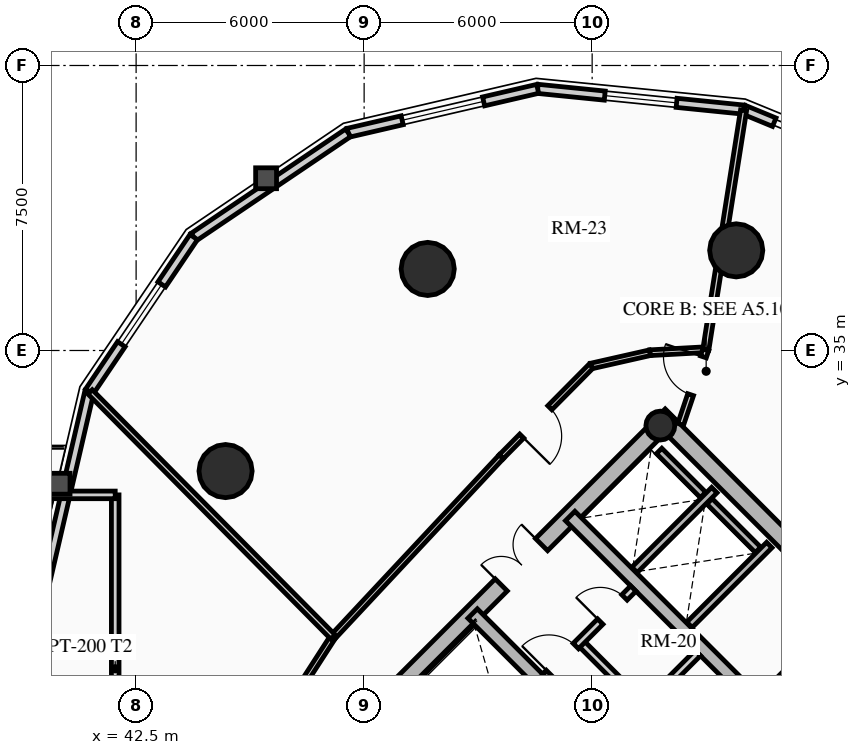
"""IFC4 building model, lengths in metres.
Left out: names, types, materials, properties, quantities, classifications, styles, units other than length and angle.
Written with IfcOpenShell. Run it as: python <this file> out.ifc"""

import sys

from ifc_helpers import new_model, si_unit, direction, frame, frame_2d, origin, origin_2d, place, context, subcontext, project, spatial, rectangle, circle, hollow_circle, extrude, source, transform, mapped, element, fill, save


model = new_model("IFC4")
c1 = context("Model", 3, precision=1e-05, world=origin(), true_north=direction((0.0, 1.0)))
c2 = subcontext(c1, "Body", "Model", "MODEL_VIEW")
j1 = project(units=[si_unit("LENGTHUNIT", "METRE"), si_unit("PLANEANGLEUNIT", "RADIAN")], contexts=[c1])
p1 = place(None, origin())
s1 = spatial("IfcSite", under=j1, at=p1, CompositionType="ELEMENT")
p2 = place(p1, origin())
s2 = spatial("IfcBuilding", under=s1, at=p2, CompositionType="ELEMENT")
p3 = place(p2, frame((0.0, 0.0, 132.88)))
s3 = spatial("IfcBuildingStorey", under=s2, at=p3, CompositionType="ELEMENT", Elevation=132.88)
p4 = place(p3, frame((66.303, 23.263, 0.0), z_axis=(0.0, 0.0, 1.0), x_axis=(-0.707106781187, 0.707106781187, 0.0)))
e1 = element("IfcWall", 1, at=p4, inside=s3, PredefinedType="SHEAR", context=c2, shape_type="SweptSolid", body=[
    extrude(rectangle(XDim=14.2, YDim=0.45, at=frame_2d((7.1, 0.0))), origin(), (0.0, 0.0, 1.0), 3.72),
])
p5 = place(p3, frame((48.856, 25.578, 0.0), z_axis=(0.0, 0.0, 1.0), x_axis=(0.707106781187, 0.707106781187, 0.0)))
e2 = element("IfcWall", 2, at=p5, inside=s3, PredefinedType="SHEAR", context=c2, shape_type="SweptSolid", body=[
    extrude(rectangle(XDim=10.7, YDim=0.45, at=frame_2d((5.35, 0.0))), origin(), (0.0, 0.0, 1.0), 3.72),
])
m1 = source(origin(), c2, "Body", "SweptSolid", [
    extrude(rectangle(XDim=1.5, YDim=2.02, at=frame_2d((0.75, 1.01))), frame((0.0, 0.235, 0.0), z_axis=(0.0, -1.0, 0.0), x_axis=(1.0, 0.0, 0.0)), (0.0, 0.0, 1.0), 0.47),
])
p6 = place(p5, frame((4.6, 0.0, 0.0)))
e3 = element("IfcOpeningElement", 3, at=p6, cuts=e2, PredefinedType="OPENING", context=c2, shape_type="MappedRepresentation", body=[
    mapped(m1, transform((0.0, 0.0, 0.0), x_axis=(1.0, 0.0, 0.0), y_axis=(0.0, 1.0, 0.0), z_axis=(0.0, 0.0, 1.0), scale=1.0)),
])
p7 = place(p3, frame((61.078, 18.355, 0.0), z_axis=(0.0, 0.0, 1.0), x_axis=(-0.707106781187, 0.707106781187, 0.0)))
e4 = element("IfcWall", 4, at=p7, inside=s3, PredefinedType="SHEAR", context=c2, shape_type="SweptSolid", body=[
    extrude(rectangle(XDim=13.75, YDim=0.35, at=frame_2d((6.875, 0.0))), origin(), (0.0, 0.0, 1.0), 3.72),
])
m2 = source(origin(), c2, "Body", "SweptSolid", [
    extrude(rectangle(XDim=1.1, YDim=2.015, at=frame_2d((0.55, 1.007))), frame((0.0, 0.185, 0.0), z_axis=(0.0, -1.0, 0.0), x_axis=(1.0, 0.0, 0.0)), (0.0, 0.0, 1.0), 0.37),
])
p8 = place(p7, frame((4.875, 0.0, 0.0)))
e5 = element("IfcOpeningElement", 5, at=p8, cuts=e4, PredefinedType="OPENING", context=c2, shape_type="MappedRepresentation", body=[
    mapped(m2, transform((0.0, 0.0, 0.0), x_axis=(1.0, 0.0, 0.0), y_axis=(0.0, 1.0, 0.0), z_axis=(0.0, 0.0, 1.0), scale=1.0)),
])
p9 = place(p7, frame((0.65, 0.0, 0.0)))
e6 = element("IfcOpeningElement", 6, at=p9, cuts=e4, PredefinedType="OPENING", context=c2, shape_type="MappedRepresentation", body=[
    mapped(m2, transform((0.0, 0.0, 0.0), x_axis=(1.0, 0.0, 0.0), y_axis=(0.0, 1.0, 0.0), z_axis=(0.0, 0.0, 1.0), scale=1.0)),
])
p10 = place(p7, frame((2.65, 0.0, 0.0)))
e7 = element("IfcOpeningElement", 7, at=p10, cuts=e4, PredefinedType="OPENING", context=c2, shape_type="MappedRepresentation", body=[
    mapped(m2, transform((0.0, 0.0, 0.0), x_axis=(1.0, 0.0, 0.0), y_axis=(0.0, 1.0, 0.0), z_axis=(0.0, 0.0, 1.0), scale=1.0)),
])
m3 = source(origin(), c2, "Body", "SweptSolid", [
    extrude(rectangle(XDim=1.15, YDim=2.02, at=frame_2d((0.575, 1.01))), frame((0.0, 0.185, 0.0), z_axis=(0.0, -1.0, 0.0), x_axis=(1.0, 0.0, 0.0)), (0.0, 0.0, 1.0), 0.37),
])
p11 = place(p7, frame((7.295, 0.0, 0.0)))
e8 = element("IfcOpeningElement", 8, at=p11, cuts=e4, PredefinedType="OPENING", context=c2, shape_type="MappedRepresentation", body=[
    mapped(m3, transform((0.0, 0.0, 0.0), x_axis=(1.0, 0.0, 0.0), y_axis=(0.0, 1.0, 0.0), z_axis=(0.0, 0.0, 1.0), scale=1.0)),
])
p12 = place(p3, frame((63.645, 20.922, 0.0), z_axis=(0.0, 0.0, 1.0), x_axis=(-0.707106781187, 0.707106781187, 0.0)))
e9 = element("IfcWall", 9, at=p12, inside=s3, PredefinedType="SHEAR", context=c2, shape_type="SweptSolid", body=[
    extrude(rectangle(XDim=13.75, YDim=0.35, at=frame_2d((6.875, 0.0))), origin(), (0.0, 0.0, 1.0), 3.72),
])
p13 = place(p12, frame((5.305, 0.0, 0.0)))
e10 = element("IfcOpeningElement", 10, at=p13, cuts=e9, PredefinedType="OPENING", context=c2, shape_type="MappedRepresentation", body=[
    mapped(m3, transform((0.0, 0.0, 0.0), x_axis=(1.0, 0.0, 0.0), y_axis=(0.0, 1.0, 0.0), z_axis=(0.0, 0.0, 1.0), scale=1.0)),
])
p14 = place(p3, frame((58.893, 25.674, 0.0), z_axis=(0.0, 0.0, 1.0), x_axis=(0.707106781187, 0.707106781187, 0.0)))
e11 = element("IfcWall", 11, at=p14, inside=s3, PredefinedType="SHEAR", context=c2, shape_type="SweptSolid", body=[
    extrude(rectangle(XDim=3.285, YDim=0.35, at=frame_2d((1.643, 0.0))), origin(), (0.0, 0.0, 1.0), 3.72),
])
p15 = place(p3, frame((56.294, 33.024, 0.0), z_axis=(0.0, 0.0, 1.0), x_axis=(0.707106781187, 0.707106781187, 0.0)))
e12 = element("IfcColumn", 12, at=p15, inside=s3, PredefinedType="COLUMN", context=c2, shape_type="SweptSolid", body=[
    extrude(hollow_circle(Radius=0.38, WallThickness=0.032, at=origin_2d()), origin(), (0.0, 0.0, 1.0), 3.72),
])
for number, where, z_axis, x_axis in (
    (13, (58.291, 37.635, 0.0), (0.0, 0.0, 1.0), (1.0, 0.0, 0.0)),
    (14, (50.173, 37.146, 0.0), (0.0, 0.0, 1.0), (1.0, 0.0, 0.0)),
    (15, (44.854, 31.827, 0.0), (0.0, 0.0, 1.0), (1.0, 0.0, 0.0)),
):
    element("IfcColumn", number, at=place(p3, frame(where, z_axis=z_axis, x_axis=x_axis)), inside=s3, PredefinedType="USERDEFINED", context=c2, shape_type="SweptSolid", body=[
        extrude(circle(Radius=0.7, at=origin_2d()), origin(), (0.0, 0.0, 1.0), 3.72),
    ])
p16 = place(p3, frame((58.487, 41.339, 0.0), z_axis=(0.0, 0.0, 1.0), x_axis=(0.924556017656, -0.381046152345, 0.0)))
e16 = element("IfcWall", 16, at=p16, inside=s3, PredefinedType="SOLIDWALL", context=c2, shape_type="SweptSolid", body=[
    extrude(rectangle(XDim=0.87, YDim=0.24, at=frame_2d((0.435, 0.0))), origin(), (0.0, 0.0, 1.0), 2.949),
])
p17 = place(p3, frame((53.067, 41.885, 0.0), z_axis=(0.0, 0.0, 1.0), x_axis=(0.994971754311, -0.10015591906, 0.0)))
e17 = element("IfcWall", 17, at=p17, inside=s3, PredefinedType="SOLIDWALL", context=c2, shape_type="SweptSolid", body=[
    extrude(rectangle(XDim=5.448, YDim=0.24, at=frame_2d((2.724, 0.0))), origin(), (0.0, 0.0, 1.0), 2.949),
])
m4 = source(origin(), c2, "Body", "SweptSolid", [
    extrude(rectangle(XDim=1.9, YDim=1.35, at=frame_2d((0.95, 0.675))), frame((0.0, 0.13, 0.0), z_axis=(0.0, -1.0, 0.0), x_axis=(1.0, 0.0, 0.0)), (0.0, 0.0, 1.0), 0.26),
])
p18 = place(p17, frame((1.774, 0.0, 0.65)))
e18 = element("IfcOpeningElement", 18, at=p18, cuts=e17, PredefinedType="OPENING", context=c2, shape_type="MappedRepresentation", body=[
    mapped(m4, transform((0.0, 0.0, 0.0), x_axis=(1.0, 0.0, 0.0), y_axis=(0.0, 1.0, 0.0), z_axis=(0.0, 0.0, 1.0), scale=1.0)),
])
p19 = place(p3, frame((48.08, 40.729, 0.0), z_axis=(0.0, 0.0, 1.0), x_axis=(0.974165631126, 0.225834725257, 0.0)))
e19 = element("IfcWall", 19, at=p19, inside=s3, PredefinedType="SOLIDWALL", context=c2, shape_type="SweptSolid", body=[
    extrude(rectangle(XDim=5.119, YDim=0.24, at=frame_2d((2.56, 0.0))), origin(), (0.0, 0.0, 1.0), 2.949),
])
m5 = source(origin(), c2, "Body", "SweptSolid", [
    extrude(rectangle(XDim=2.2, YDim=1.35, at=frame_2d((1.1, 0.675))), frame((0.0, 0.13, 0.0), z_axis=(0.0, -1.0, 0.0), x_axis=(1.0, 0.0, 0.0)), (0.0, 0.0, 1.0), 0.26),
])
p20 = place(p19, frame((1.459, 0.0, 0.65)))
e20 = element("IfcOpeningElement", 20, at=p20, cuts=e19, PredefinedType="OPENING", context=c2, shape_type="MappedRepresentation", body=[
    mapped(m5, transform((0.0, 0.0, 0.0), x_axis=(1.0, 0.0, 0.0), y_axis=(0.0, 1.0, 0.0), z_axis=(0.0, 0.0, 1.0), scale=1.0)),
])
p21 = place(p3, frame((44.015, 37.985, 0.0), z_axis=(0.0, 0.0, 1.0), x_axis=(0.828781148131, 0.559572880421, 0.0)))
e21 = element("IfcWall", 21, at=p21, inside=s3, PredefinedType="SOLIDWALL", context=c2, shape_type="SweptSolid", body=[
    extrude(rectangle(XDim=4.905, YDim=0.24, at=frame_2d((2.452, 0.0))), origin(), (0.0, 0.0, 1.0), 2.949),
])
p22 = place(p3, frame((41.271, 33.92, 0.0), z_axis=(0.0, 0.0, 1.0), x_axis=(0.559572880421, 0.828781148131, 0.0)))
e22 = element("IfcWall", 22, at=p22, inside=s3, PredefinedType="SOLIDWALL", context=c2, shape_type="SweptSolid", body=[
    extrude(rectangle(XDim=4.905, YDim=0.24, at=frame_2d((2.452, 0.0))), origin(), (0.0, 0.0, 1.0), 2.949),
])
p23 = place(p22, frame((1.502, 0.0, 0.65)))
e23 = element("IfcOpeningElement", 23, at=p23, cuts=e22, PredefinedType="OPENING", context=c2, shape_type="MappedRepresentation", body=[
    mapped(m4, transform((0.0, 0.0, 0.0), x_axis=(1.0, 0.0, 0.0), y_axis=(0.0, 1.0, 0.0), z_axis=(0.0, 0.0, 1.0), scale=1.0)),
])
p24 = place(p3, frame((40.115, 28.933, 0.0), z_axis=(0.0, 0.0, 1.0), x_axis=(0.225834725257, 0.974165631126, 0.0)))
e24 = element("IfcWall", 24, at=p24, inside=s3, PredefinedType="SOLIDWALL", context=c2, shape_type="SweptSolid", body=[
    extrude(rectangle(XDim=5.119, YDim=0.24, at=frame_2d((2.56, 0.0))), origin(), (0.0, 0.0, 1.0), 2.949),
])
p25 = place(p3, frame((57.062, 27.781, 0.0), z_axis=(0.0, 0.0, 1.0), x_axis=(0.707106781187, 0.707106781187, 0.0)))
e25 = element("IfcWall", 25, at=p25, inside=s3, PredefinedType="SHEAR", context=c2, shape_type="SweptSolid", body=[
    extrude(rectangle(XDim=2.97, YDim=0.2, at=frame_2d((1.485, 0.0))), origin(), (0.0, 0.0, 1.0), 3.72),
])
p26 = place(p3, frame((55.615, 29.227, 0.0), z_axis=(0.0, 0.0, 1.0), x_axis=(0.707147878904, 0.70706568108, 0.0)))
e26 = element("IfcWall", 26, at=p26, inside=s3, PredefinedType="SHEAR", context=c2, shape_type="SweptSolid", body=[
    extrude(rectangle(XDim=2.97, YDim=0.2, at=frame_2d((1.485, 0.0))), origin(), (0.0, 0.0, 1.0), 3.72),
])
p27 = place(p3, frame((58.865, 29.754, 0.0), z_axis=(0.0, 0.0, 1.0), x_axis=(-0.707174411312, 0.707039144592, 0.0)))
e27 = element("IfcWall", 27, at=p27, inside=s3, PredefinedType="SHEAR", context=c2, shape_type="SweptSolid", body=[
    extrude(rectangle(XDim=1.805, YDim=0.2, at=frame_2d((0.902, 0.0))), origin(), (0.0, 0.0, 1.0), 3.72),
])
p28 = place(p3, frame((57.419, 31.2, 0.0), z_axis=(0.0, 0.0, 1.0), x_axis=(-0.707032117043, 0.707181437447, 0.0)))
e28 = element("IfcWall", 28, at=p28, inside=s3, PredefinedType="SHEAR", context=c2, shape_type="SweptSolid", body=[
    extrude(rectangle(XDim=1.635, YDim=0.2, at=frame_2d((0.817, 0.0))), origin(), (0.0, 0.0, 1.0), 3.72),
])
p29 = place(p3, frame((41.95, 17.8, 0.0), z_axis=(0.0, 0.0, 1.0), x_axis=(0.0, 1.0, 0.0)))
e29 = element("IfcWall", 29, at=p29, inside=s3, PredefinedType="PARTITIONING", context=c2, shape_type="SweptSolid", body=[
    extrude(rectangle(XDim=13.4, YDim=0.2, at=frame_2d((6.7, 0.0))), origin(), (0.0, 0.0, 1.0), 2.949),
])
m6 = source(origin(), c2, "Body", "SweptSolid", [
    extrude(rectangle(XDim=1.8, YDim=2.05, at=frame_2d((0.9, 1.025))), frame((0.0, 0.11, 0.0), z_axis=(0.0, -1.0, 0.0), x_axis=(1.0, 0.0, 0.0)), (0.0, 0.0, 1.0), 0.22),
])
p30 = place(p29, frame((2.1, 0.0, 0.0)))
e30 = element("IfcOpeningElement", 30, at=p30, cuts=e29, PredefinedType="OPENING", context=c2, shape_type="MappedRepresentation", body=[
    mapped(m6, transform((0.0, 0.0, 0.0), x_axis=(1.0, 0.0, 0.0), y_axis=(0.0, 1.0, 0.0), z_axis=(0.0, 0.0, 1.0), scale=1.0)),
])
p31 = place(p3, frame((39.85, 31.2, 0.0), z_axis=(0.0, 0.0, 1.0), x_axis=(1.0, 0.0, 0.0)))
e31 = element("IfcWall", 31, at=p31, inside=s3, PredefinedType="PARTITIONING", context=c2, shape_type="SweptSolid", body=[
    extrude(rectangle(XDim=2.1, YDim=0.2, at=frame_2d((1.05, 0.0))), origin(), (0.0, 0.0, 1.0), 2.949),
])
p32 = place(p3, frame((54.961, 24.719, 0.0), z_axis=(0.0, 0.0, 1.0), x_axis=(0.707106781187, 0.707106781187, 0.0)))
e32 = element("IfcWall", 32, at=p32, inside=s3, PredefinedType="PARTITIONING", context=c2, shape_type="SweptSolid", body=[
    extrude(rectangle(XDim=3.28, YDim=0.2, at=frame_2d((1.64, 0.0))), origin(), (0.0, 0.0, 1.0), 3.425),
])
m7 = source(origin(), c2, "Body", "SweptSolid", [
    extrude(rectangle(XDim=0.9, YDim=2.005, at=frame_2d((0.45, 1.002))), frame((0.0, 0.11, 0.0), z_axis=(0.0, -1.0, 0.0), x_axis=(1.0, 0.0, 0.0)), (0.0, 0.0, 1.0), 0.22),
])
p33 = place(p32, frame((0.16, 0.0, 0.0)))
e33 = element("IfcOpeningElement", 33, at=p33, cuts=e32, PredefinedType="OPENING", context=c2, shape_type="MappedRepresentation", body=[
    mapped(m7, transform((0.0, 0.0, 0.0), x_axis=(1.0, 0.0, 0.0), y_axis=(0.0, 1.0, 0.0), z_axis=(0.0, 0.0, 1.0), scale=1.0)),
])
p34 = place(p3, frame((55.874, 25.631, 0.0), z_axis=(0.0, 0.0, 1.0), x_axis=(-0.707157639372, 0.707055919343, 0.0)))
e34 = element("IfcWall", 34, at=p34, inside=s3, PredefinedType="PARTITIONING", context=c2, shape_type="SweptSolid", body=[
    extrude(rectangle(XDim=2.4, YDim=0.2, at=frame_2d((1.2, 0.0))), origin(), (0.0, 0.0, 1.0), 3.425),
])
p35 = place(p3, frame((53.264, 26.416, 0.0), z_axis=(0.0, 0.0, 1.0), x_axis=(0.707106781187, 0.707106781187, 0.0)))
e35 = element("IfcWall", 35, at=p35, inside=s3, PredefinedType="PARTITIONING", context=c2, shape_type="SweptSolid", body=[
    extrude(rectangle(XDim=3.28, YDim=0.2, at=frame_2d((1.64, 0.0))), origin(), (0.0, 0.0, 1.0), 3.425),
])
m8 = source(origin(), c2, "Body", "SweptSolid", [
    extrude(rectangle(XDim=1.0, YDim=2.015, at=frame_2d((0.5, 1.007))), frame((0.0, 0.11, 0.0), z_axis=(0.0, -1.0, 0.0), x_axis=(1.0, 0.0, 0.0)), (0.0, 0.0, 1.0), 0.22),
])
p36 = place(p35, frame((0.14, 0.0, 0.0)))
e36 = element("IfcOpeningElement", 36, at=p36, cuts=e35, PredefinedType="OPENING", context=c2, shape_type="MappedRepresentation", body=[
    mapped(m8, transform((0.0, 0.0, 0.0), x_axis=(1.0, 0.0, 0.0), y_axis=(0.0, 1.0, 0.0), z_axis=(0.0, 0.0, 1.0), scale=1.0)),
])
p37 = place(p35, frame((2.05, 0.0, 0.0)))
e37 = element("IfcOpeningElement", 37, at=p37, cuts=e35, PredefinedType="OPENING", context=c2, shape_type="MappedRepresentation", body=[
    mapped(m7, transform((0.0, 0.0, 0.0), x_axis=(1.0, 0.0, 0.0), y_axis=(0.0, 1.0, 0.0), z_axis=(0.0, 0.0, 1.0), scale=1.0)),
])
p38 = place(p3, frame((57.491, 35.021, 0.0), z_axis=(0.0, 0.0, 1.0), x_axis=(-0.9985194771, -0.054395347698, 0.0)))
e38 = element("IfcWall", 38, at=p38, inside=s3, PredefinedType="PARTITIONING", context=c2, shape_type="SweptSolid", body=[
    extrude(rectangle(XDim=1.472, YDim=0.15, at=frame_2d((0.736, 0.0))), origin(), (0.0, 0.0, 1.0), 2.995),
])
p39 = place(p3, frame((56.021, 34.941, 0.0), z_axis=(0.0, 0.0, 1.0), x_axis=(-0.975309543901, -0.220842236847, 0.0)))
e39 = element("IfcWall", 39, at=p39, inside=s3, PredefinedType="PARTITIONING", context=c2, shape_type="SweptSolid", body=[
    extrude(rectangle(XDim=1.585, YDim=0.15, at=frame_2d((0.792, 0.0))), origin(), (0.0, 0.0, 1.0), 2.995),
])
p40 = place(p3, frame((54.475, 34.591, 0.0), z_axis=(0.0, 0.0, 1.0), x_axis=(-0.703869646439, -0.710329163714, 0.0)))
e40 = element("IfcWall", 40, at=p40, inside=s3, PredefinedType="PARTITIONING", context=c2, shape_type="SweptSolid", body=[
    extrude(rectangle(XDim=3.364, YDim=0.15, at=frame_2d((1.682, 0.0))), origin(), (0.0, 0.0, 1.0), 2.995),
])
m9 = source(origin(), c2, "Body", "SweptSolid", [
    extrude(rectangle(XDim=1.05, YDim=2.015, at=frame_2d((0.525, 1.007))), frame((0.0, 0.085, 0.0), z_axis=(0.0, -1.0, 0.0), x_axis=(1.0, 0.0, 0.0)), (0.0, 0.0, 1.0), 0.17),
])
p41 = place(p40, frame((1.546, 0.0, 0.0)))
e41 = element("IfcOpeningElement", 41, at=p41, cuts=e40, PredefinedType="OPENING", context=c2, shape_type="MappedRepresentation", body=[
    mapped(m9, transform((0.0, 0.0, 0.0), x_axis=(1.0, 0.0, 0.0), y_axis=(0.0, 1.0, 0.0), z_axis=(0.0, 0.0, 1.0), scale=1.0)),
])
p42 = place(p3, frame((52.107, 32.202, 0.0), z_axis=(0.0, 0.0, 1.0), x_axis=(-0.682605209028, -0.730787334734, 0.0)))
e42 = element("IfcWall", 42, at=p42, inside=s3, PredefinedType="PARTITIONING", context=c2, shape_type="SweptSolid", body=[
    extrude(rectangle(XDim=6.486, YDim=0.15, at=frame_2d((3.243, 0.0))), origin(), (0.0, 0.0, 1.0), 2.995),
])
p43 = place(p3, frame((47.68, 27.462, 0.0), z_axis=(0.0, 0.0, 1.0), x_axis=(-0.542097952486, -0.840315303865, 0.0)))
e43 = element("IfcWall", 43, at=p43, inside=s3, PredefinedType="PARTITIONING", context=c2, shape_type="SweptSolid", body=[
    extrude(rectangle(XDim=1.923, YDim=0.15, at=frame_2d((0.961, 0.0))), origin(), (0.0, 0.0, 1.0), 2.995),
])
p44 = place(p3, frame((57.491, 35.021, 0.0), z_axis=(0.0, 0.0, 1.0), x_axis=(0.155805268746, 0.98778779008, 0.0)))
e44 = element("IfcWall", 44, at=p44, inside=s3, PredefinedType="PARTITIONING", context=c2, shape_type="SweptSolid", body=[
    extrude(rectangle(XDim=6.376, YDim=0.16, at=frame_2d((3.188, 0.0))), origin(), (0.0, 0.0, 1.0), 2.949),
])
p45 = place(p3, frame((47.68, 27.462, 0.0), z_axis=(0.0, 0.0, 1.0), x_axis=(-0.703913074907, 0.710286127539, 0.0)))
e45 = element("IfcWall", 45, at=p45, inside=s3, PredefinedType="PARTITIONING", context=c2, shape_type="SweptSolid", body=[
    extrude(rectangle(XDim=9.079, YDim=0.16, at=frame_2d((4.54, 0.0))), origin(), (0.0, 0.0, 1.0), 2.512),
])
p46 = place(p3, frame((56.828, 33.056, 0.0), z_axis=(0.0, 0.0, 1.0), x_axis=(0.319439175969, 0.94760678177, 0.0)))
e46 = element("IfcWall", 46, at=p46, inside=s3, PredefinedType="PARTITIONING", context=c2, shape_type="SweptSolid", body=[
    extrude(rectangle(XDim=2.074, YDim=0.16, at=frame_2d((1.037, 0.0))), origin(), (0.0, 0.0, 1.0), 2.995),
])
m10 = source(origin(), c2, "Body", "SweptSolid", [
    extrude(rectangle(XDim=1.05, YDim=2.015, at=frame_2d((0.525, 1.007))), frame((0.0, 0.09, 0.0), z_axis=(0.0, -1.0, 0.0), x_axis=(1.0, 0.0, 0.0)), (0.0, 0.0, 1.0), 0.18),
])
p47 = place(p46, frame((0.824, 0.0, 0.0)))
e47 = element("IfcOpeningElement", 47, at=p47, cuts=e46, PredefinedType="OPENING", context=c2, shape_type="MappedRepresentation", body=[
    mapped(m10, transform((0.0, 0.0, 0.0), x_axis=(1.0, 0.0, 0.0), y_axis=(0.0, 1.0, 0.0), z_axis=(0.0, 0.0, 1.0), scale=1.0)),
])
m11 = source(origin(), c2, "Body", "SweptSolid", [
    extrude(rectangle(XDim=1.9, YDim=1.35, at=frame_2d((0.95, 0.675))), frame((0.0, 0.03, 0.0), z_axis=(0.0, -1.0, 0.0), x_axis=(1.0, 0.0, 0.0)), (0.0, 0.0, 1.0), 0.06),
])
p48 = place(p18, origin())
e48 = element("IfcWindow", 48, at=p48, inside=s3, PartitioningType="DOUBLE_PANEL_VERTICAL", PredefinedType="WINDOW", context=c2, shape_type="MappedRepresentation", body=[
    mapped(m11, transform((0.0, 0.0, 0.0), x_axis=(1.0, 0.0, 0.0), y_axis=(0.0, 1.0, 0.0), z_axis=(0.0, 0.0, 1.0), scale=1.0)),
])
fill(e18, e48)
m12 = source(origin(), c2, "Body", "SweptSolid", [
    extrude(rectangle(XDim=2.2, YDim=1.35, at=frame_2d((1.1, 0.675))), frame((0.0, 0.03, 0.0), z_axis=(0.0, -1.0, 0.0), x_axis=(1.0, 0.0, 0.0)), (0.0, 0.0, 1.0), 0.06),
])
p49 = place(p20, origin())
e49 = element("IfcWindow", 49, at=p49, inside=s3, PartitioningType="DOUBLE_PANEL_VERTICAL", PredefinedType="WINDOW", context=c2, shape_type="MappedRepresentation", body=[
    mapped(m12, transform((0.0, 0.0, 0.0), x_axis=(1.0, 0.0, 0.0), y_axis=(0.0, 1.0, 0.0), z_axis=(0.0, 0.0, 1.0), scale=1.0)),
])
fill(e20, e49)
p50 = place(p23, origin())
e50 = element("IfcWindow", 50, at=p50, inside=s3, PartitioningType="DOUBLE_PANEL_VERTICAL", PredefinedType="WINDOW", context=c2, shape_type="MappedRepresentation", body=[
    mapped(m11, transform((0.0, 0.0, 0.0), x_axis=(1.0, 0.0, 0.0), y_axis=(0.0, 1.0, 0.0), z_axis=(0.0, 0.0, 1.0), scale=1.0)),
])
fill(e23, e50)
m13 = source(origin(), c2, "Body", "SweptSolid", [
    extrude(rectangle(XDim=1.5, YDim=2.02, at=frame_2d((0.75, 1.01))), frame((0.0, 0.025, 0.0), z_axis=(0.0, -1.0, 0.0), x_axis=(1.0, 0.0, 0.0)), (0.0, 0.0, 1.0), 0.05),
])
p51 = place(p6, origin())
e51 = element("IfcDoor", 51, at=p51, inside=s3, OperationType="DOUBLE_DOOR_SINGLE_SWING", PredefinedType="DOOR", context=c2, shape_type="MappedRepresentation", body=[
    mapped(m13, transform((0.0, 0.0, 0.0), x_axis=(1.0, 0.0, 0.0), y_axis=(0.0, 1.0, 0.0), z_axis=(0.0, 0.0, 1.0), scale=1.0)),
])
fill(e3, e51)
m14 = source(origin(), c2, "Body", "SweptSolid", [
    extrude(rectangle(XDim=1.0, YDim=2.015, at=frame_2d((0.5, 1.007))), frame((0.0, 0.025, 0.0), z_axis=(0.0, -1.0, 0.0), x_axis=(1.0, 0.0, 0.0)), (0.0, 0.0, 1.0), 0.05),
])
p52 = place(p36, origin())
e52 = element("IfcDoor", 52, at=p52, inside=s3, OperationType="SINGLE_SWING_LEFT", PredefinedType="DOOR", context=c2, shape_type="MappedRepresentation", body=[
    mapped(m14, transform((0.0, 0.0, 0.0), x_axis=(1.0, 0.0, 0.0), y_axis=(0.0, 1.0, 0.0), z_axis=(0.0, 0.0, 1.0), scale=1.0)),
])
fill(e36, e52)
m15 = source(origin(), c2, "Body", "SweptSolid", [
    extrude(rectangle(XDim=0.9, YDim=2.005, at=frame_2d((0.45, 1.002))), frame((0.0, 0.025, 0.0), z_axis=(0.0, -1.0, 0.0), x_axis=(1.0, 0.0, 0.0)), (0.0, 0.0, 1.0), 0.05),
])
p53 = place(p37, origin())
e53 = element("IfcDoor", 53, at=p53, inside=s3, OperationType="SINGLE_SWING_LEFT", PredefinedType="DOOR", context=c2, shape_type="MappedRepresentation", body=[
    mapped(m15, transform((0.0, 0.0, 0.0), x_axis=(1.0, 0.0, 0.0), y_axis=(0.0, 1.0, 0.0), z_axis=(0.0, 0.0, 1.0), scale=1.0)),
])
fill(e37, e53)
m16 = source(origin(), c2, "Body", "SweptSolid", [
    extrude(rectangle(XDim=1.05, YDim=2.015, at=frame_2d((0.525, 1.007))), frame((0.0, 0.025, 0.0), z_axis=(0.0, -1.0, 0.0), x_axis=(1.0, 0.0, 0.0)), (0.0, 0.0, 1.0), 0.05),
])
p54 = place(p47, origin())
e54 = element("IfcDoor", 54, at=p54, inside=s3, OperationType="SINGLE_SWING_RIGHT", PredefinedType="DOOR", context=c2, shape_type="MappedRepresentation", body=[
    mapped(m16, transform((0.0, 0.0, 0.0), x_axis=(1.0, 0.0, 0.0), y_axis=(0.0, 1.0, 0.0), z_axis=(0.0, 0.0, 1.0), scale=1.0)),
])
fill(e47, e54)
p55 = place(p41, origin())
e55 = element("IfcDoor", 55, at=p55, inside=s3, OperationType="SINGLE_SWING_RIGHT", PredefinedType="DOOR", context=c2, shape_type="MappedRepresentation", body=[
    mapped(m16, transform((0.0, 0.0, 0.0), x_axis=(1.0, 0.0, 0.0), y_axis=(0.0, 1.0, 0.0), z_axis=(0.0, 0.0, 1.0), scale=1.0)),
])
fill(e41, e55)
save(model, sys.argv[1])
